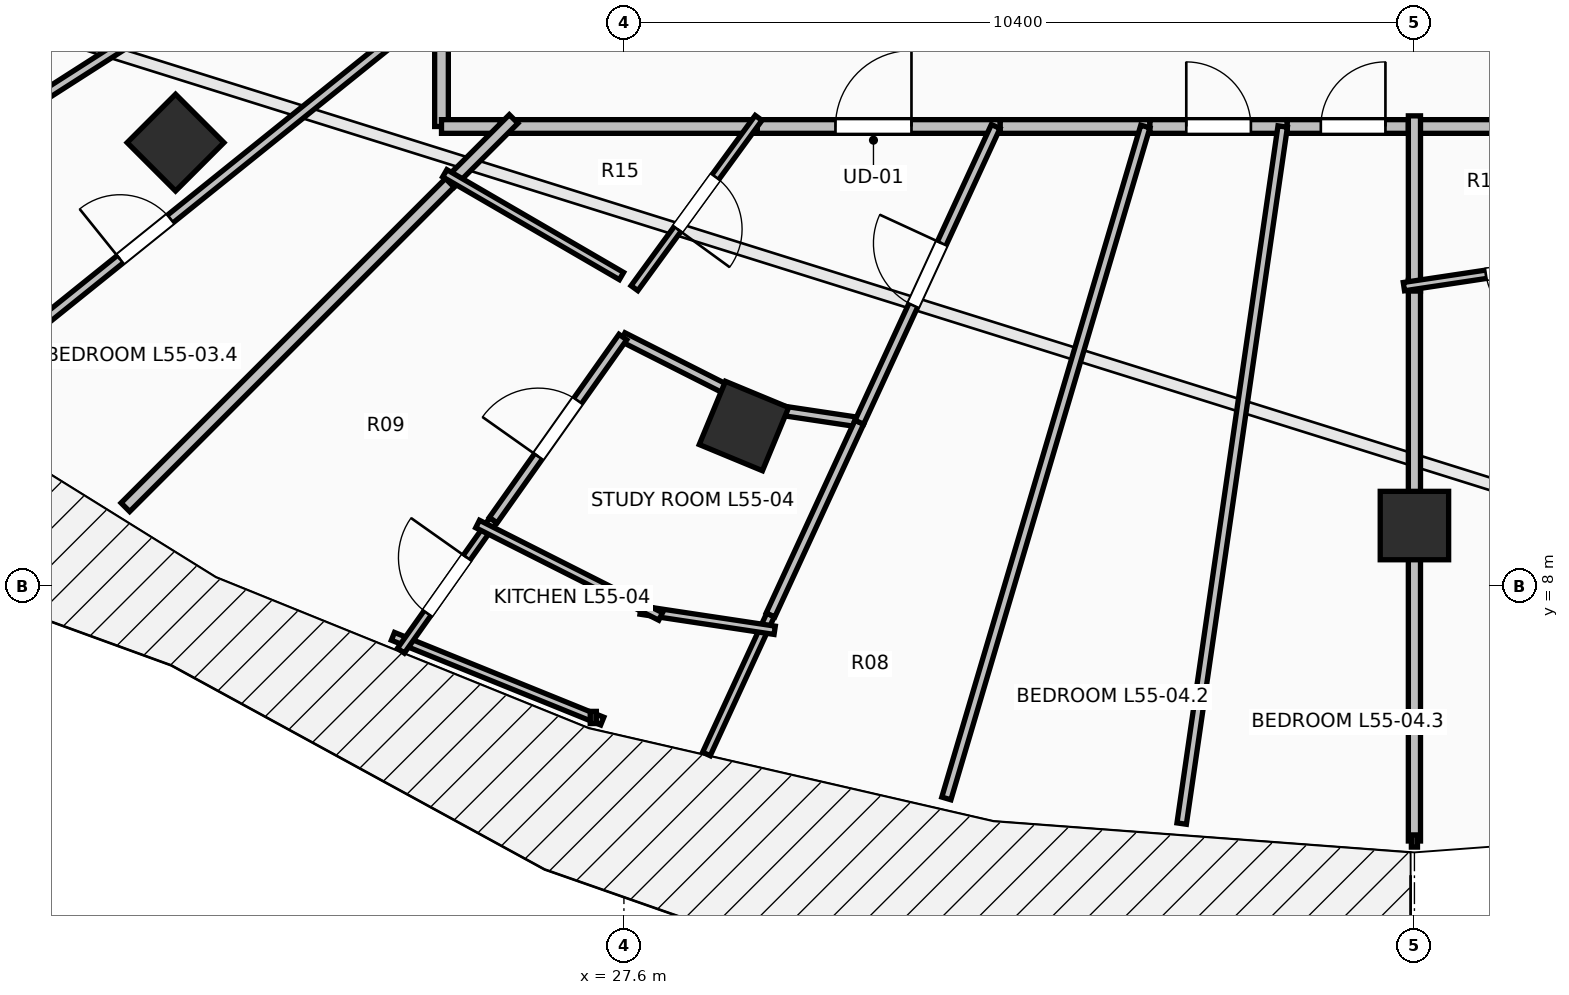
"""IFC4 building model, lengths in metres.
Left out: names, types, materials, properties, quantities, classifications, styles, units other than length and angle.
Written with IfcOpenShell. Run it as: python <this file> out.ifc"""

import sys

from ifc_helpers import new_model, si_unit, direction, frame, frame_2d, origin, origin_2d, place, context, subcontext, project, spatial, rectangle, extrude, element, fill, save


model = new_model("IFC4")
c1 = context("Model", 3, precision=1e-05, world=origin(), true_north=direction((0.0, 1.0)))
c2 = subcontext(c1, "Body", "Model", "MODEL_VIEW")
j1 = project(units=[si_unit("LENGTHUNIT", "METRE"), si_unit("PLANEANGLEUNIT", "RADIAN")], contexts=[c1])
p1 = place(None, origin())
s1 = spatial("IfcSite", under=j1, at=p1, CompositionType="ELEMENT")
p2 = place(p1, origin())
s2 = spatial("IfcBuilding", under=s1, at=p2, CompositionType="ELEMENT")
p3 = place(p2, frame((0.0, 0.0, 203.65)))
s3 = spatial("IfcBuildingStorey", under=s2, at=p3, CompositionType="ELEMENT", Elevation=203.65)
for number, where, z_axis, x_axis in (
    (1, (21.701, 13.838, 0.0), (0.0, 0.0, 1.0), (-0.707, -0.707, 0.0)),
    (2, (29.179, 10.109, 0.0), (0.0, 0.0, 1.0), (-0.383, -0.924, 0.0)),
    (3, (38.0, 8.8, 0.0), (0.0, 0.0, 1.0), (0.0, -1.0, 0.0)),
):
    element("IfcColumn", number, at=place(p3, frame(where, z_axis=z_axis, x_axis=x_axis)), inside=s3, PredefinedType="COLUMN", context=c2, shape_type="SweptSolid", body=[
        extrude(rectangle(XDim=0.9, YDim=0.9, at=origin_2d()), origin(), (0.0, 0.0, 1.0), 3.55),
    ])
p4 = place(p3, frame((25.2, 15.627, 0.0), z_axis=(0.0, 0.0, 1.0), x_axis=(0.0, -1.0, 0.0)))
e4 = element("IfcWall", 4, at=p4, inside=s3, PredefinedType="PARTITIONING", context=c2, shape_type="SweptSolid", body=[
    extrude(rectangle(XDim=1.577, YDim=0.18, at=frame_2d((0.789, 0.0))), origin(), (0.0, 0.0, 1.0), 2.482),
])
p5 = place(p3, frame((25.2, 14.05, 0.0), z_axis=(0.0, 0.0, 1.0), x_axis=(1.0, 0.0, 0.0)))
e5 = element("IfcWall", 5, at=p5, inside=s3, PredefinedType="PARTITIONING", context=c2, shape_type="SweptSolid", body=[
    extrude(rectangle(XDim=0.91, YDim=0.18, at=frame_2d((0.455, 0.0))), origin(), (0.0, 0.0, 1.0), 3.022),
])
p6 = place(p3, frame((29.215, 14.05, 0.0), z_axis=(0.0, 0.0, 1.0), x_axis=(1.0, 0.0, 0.0)))
e6 = element("IfcWall", 6, at=p6, inside=s3, PredefinedType="PARTITIONING", context=c2, shape_type="SweptSolid", body=[
    extrude(rectangle(XDim=3.336, YDim=0.18, at=frame_2d((1.668, 0.0))), origin(), (0.0, 0.0, 1.0), 2.936),
])
p7 = place(p6, frame((1.168, 0.0, 0.0)))
e7 = element("IfcOpeningElement", 7, at=p7, cuts=e6, PredefinedType="OPENING", context=c2, shape_type="SweptSolid", body=[
    extrude(rectangle(XDim=1.0, YDim=2.15, at=frame_2d((0.5, 1.075))), frame((0.0, 0.105, 0.0), z_axis=(0.0, -1.0, 0.0), x_axis=(1.0, 0.0, 0.0)), (0.0, 0.0, 1.0), 0.21),
])
p8 = place(p3, frame((25.97, 14.05, 0.0), z_axis=(0.0, 0.0, 1.0), x_axis=(1.0, 0.0, 0.0)))
e8 = element("IfcWall", 8, at=p8, inside=s3, PredefinedType="PARTITIONING", context=c2, shape_type="SweptSolid", body=[
    extrude(rectangle(XDim=3.385, YDim=0.18, at=frame_2d((1.692, 0.0))), origin(), (0.0, 0.0, 1.0), 2.482),
])
p9 = place(p3, frame((32.551, 14.05, 0.0), z_axis=(0.0, 0.0, 1.0), x_axis=(1.0, 0.0, 0.0)))
e9 = element("IfcWall", 9, at=p9, inside=s3, PredefinedType="PARTITIONING", context=c2, shape_type="SweptSolid", body=[
    extrude(rectangle(XDim=1.969, YDim=0.18, at=frame_2d((0.984, 0.0))), origin(), (0.0, 0.0, 1.0), 2.936),
])
p10 = place(p3, frame((34.52, 14.05, 0.0), z_axis=(0.0, 0.0, 1.0), x_axis=(1.0, 0.0, 0.0)))
e10 = element("IfcWall", 10, at=p10, inside=s3, PredefinedType="PARTITIONING", context=c2, shape_type="SweptSolid", body=[
    extrude(rectangle(XDim=1.807, YDim=0.18, at=frame_2d((0.903, 0.0))), origin(), (0.0, 0.0, 1.0), 2.936),
])
p11 = place(p10, frame((0.479, 0.0, 0.0)))
e11 = element("IfcOpeningElement", 11, at=p11, cuts=e10, PredefinedType="OPENING", context=c2, shape_type="SweptSolid", body=[
    extrude(rectangle(XDim=0.85, YDim=2.1, at=frame_2d((0.425, 1.05))), frame((0.0, 0.105, 0.0), z_axis=(0.0, -1.0, 0.0), x_axis=(1.0, 0.0, 0.0)), (0.0, 0.0, 1.0), 0.21),
])
p12 = place(p3, frame((36.327, 14.05, 0.0), z_axis=(0.0, 0.0, 1.0), x_axis=(1.0, 0.0, 0.0)))
e12 = element("IfcWall", 12, at=p12, inside=s3, PredefinedType="PARTITIONING", context=c2, shape_type="SweptSolid", body=[
    extrude(rectangle(XDim=1.733, YDim=0.18, at=frame_2d((0.867, 0.0))), origin(), (0.0, 0.0, 1.0), 2.936),
])
p13 = place(p12, frame((0.441, 0.0, 0.0)))
e13 = element("IfcOpeningElement", 13, at=p13, cuts=e12, PredefinedType="OPENING", context=c2, shape_type="SweptSolid", body=[
    extrude(rectangle(XDim=0.85, YDim=2.1, at=frame_2d((0.425, 1.05))), frame((0.0, 0.105, 0.0), z_axis=(0.0, -1.0, 0.0), x_axis=(1.0, 0.0, 0.0)), (0.0, 0.0, 1.0), 0.21),
])
p14 = place(p3, frame((37.92, 14.05, 0.0), z_axis=(0.0, 0.0, 1.0), x_axis=(1.0, 0.0, 0.0)))
e14 = element("IfcWall", 14, at=p14, inside=s3, PredefinedType="PARTITIONING", context=c2, shape_type="SweptSolid", body=[
    extrude(rectangle(XDim=2.545, YDim=0.18, at=frame_2d((1.272, 0.0))), origin(), (0.0, 0.0, 1.0), 2.936),
])
p15 = place(p3, frame((14.428, 14.28, 0.0), z_axis=(0.0, 0.0, 1.0), x_axis=(0.895423439435, 0.44521552546, 0.0)))
e15 = element("IfcWall", 15, at=p15, inside=s3, PredefinedType="PARTITIONING", context=c2, shape_type="SweptSolid", body=[
    extrude(rectangle(XDim=12.03, YDim=0.125, at=frame_2d((6.015, 0.0))), origin(), (0.0, 0.0, 1.0), 2.482),
])
p16 = place(p3, frame((16.555, 12.272, 0.0), z_axis=(0.0, 0.0, 1.0), x_axis=(0.842221721565, 0.539131312135, 0.0)))
e16 = element("IfcWall", 16, at=p16, inside=s3, PredefinedType="PARTITIONING", context=c2, shape_type="SweptSolid", body=[
    extrude(rectangle(XDim=10.265, YDim=0.125, at=frame_2d((5.132, 0.0))), origin(), (0.0, 0.0, 1.0), 2.482),
])
p17 = place(p3, frame((18.715, 10.487, 0.0), z_axis=(0.0, 0.0, 1.0), x_axis=(0.779157389419, 0.626828335762, 0.0)))
e17 = element("IfcWall", 17, at=p17, inside=s3, PredefinedType="PARTITIONING", context=c2, shape_type="SweptSolid", body=[
    extrude(rectangle(XDim=8.323, YDim=0.125, at=frame_2d((4.162, 0.0))), origin(), (0.0, 0.0, 1.0), 2.482),
])
p18 = place(p17, frame((2.896, 0.0, 0.0)))
e18 = element("IfcOpeningElement", 18, at=p18, cuts=e17, PredefinedType="OPENING", context=c2, shape_type="SweptSolid", body=[
    extrude(rectangle(XDim=0.85, YDim=2.1, at=frame_2d((0.425, 1.05))), frame((0.0, 0.077, 0.0), z_axis=(0.0, -1.0, 0.0), x_axis=(1.0, 0.0, 0.0)), (0.0, 0.0, 1.0), 0.155),
])
p19 = place(p3, frame((21.041, 9.041, 0.0), z_axis=(0.0, 0.0, 1.0), x_axis=(0.707106781187, 0.707106781187, 0.0)))
e19 = element("IfcWall", 19, at=p19, inside=s3, PredefinedType="PARTITIONING", context=c2, shape_type="SweptSolid", body=[
    extrude(rectangle(XDim=6.176, YDim=0.16, at=frame_2d((3.088, 0.0))), origin(), (0.0, 0.0, 1.0), 2.824),
])
p20 = place(p3, frame((25.309, 13.309, 0.0), z_axis=(0.0, 0.0, 1.0), x_axis=(0.707106781187, 0.707106781187, 0.0)))
e20 = element("IfcWall", 20, at=p20, inside=s3, PredefinedType="PARTITIONING", context=c2, shape_type="SweptSolid", body=[
    extrude(rectangle(XDim=1.188, YDim=0.16, at=frame_2d((0.594, 0.0))), origin(), (0.0, 0.0, 1.0), 3.022),
])
p21 = place(p3, frame((29.372, 14.163, 0.0), z_axis=(0.0, 0.0, 1.0), x_axis=(-0.589066743954, -0.808084383693, 0.0)))
e21 = element("IfcWall", 21, at=p21, inside=s3, PredefinedType="PARTITIONING", context=c2, shape_type="SweptSolid", body=[
    extrude(rectangle(XDim=2.772, YDim=0.11, at=frame_2d((1.386, 0.0))), origin(), (0.0, 0.0, 1.0), 2.482),
])
p22 = place(p21, frame((0.961, 0.0, 0.0)))
e22 = element("IfcOpeningElement", 22, at=p22, cuts=e21, PredefinedType="OPENING", context=c2, shape_type="SweptSolid", body=[
    extrude(rectangle(XDim=0.85, YDim=2.1, at=frame_2d((0.425, 1.05))), frame((0.0, 0.07, 0.0), z_axis=(0.0, -1.0, 0.0), x_axis=(1.0, 0.0, 0.0)), (0.0, 0.0, 1.0), 0.14),
])
p23 = place(p3, frame((27.568, 12.083, 0.0), z_axis=(0.0, 0.0, 1.0), x_axis=(-0.864515441931, 0.502606258082, 0.0)))
e23 = element("IfcWall", 23, at=p23, inside=s3, PredefinedType="PARTITIONING", context=c2, shape_type="SweptSolid", body=[
    extrude(rectangle(XDim=2.69, YDim=0.11, at=frame_2d((1.345, 0.0))), origin(), (0.0, 0.0, 1.0), 3.29),
])
p24 = place(p3, frame((29.529, 7.624, 0.0), z_axis=(0.0, 0.0, 1.0), x_axis=(-0.418673802252, -0.908136689771, 0.0)))
e24 = element("IfcWall", 24, at=p24, inside=s3, PredefinedType="PARTITIONING", context=c2, shape_type="SweptSolid", body=[
    extrude(rectangle(XDim=2.014, YDim=0.11, at=frame_2d((1.007, 0.0))), origin(), (0.0, 0.0, 1.0), 3.29),
])
p25 = place(p3, frame((24.561, 7.343, 0.0), z_axis=(0.0, 0.0, 1.0), x_axis=(0.926858319785, -0.375411314487, 0.0)))
e25 = element("IfcWall", 25, at=p25, inside=s3, PredefinedType="PARTITIONING", context=c2, shape_type="SweptSolid", body=[
    extrude(rectangle(XDim=2.971, YDim=0.11, at=frame_2d((1.485, 0.0))), origin(), (0.0, 0.0, 1.0), 3.29),
])
p26 = place(p3, frame((24.666, 7.154, 0.0), z_axis=(0.0, 0.0, 1.0), x_axis=(0.577389248155, 0.816469017241, 0.0)))
e26 = element("IfcWall", 26, at=p26, inside=s3, PredefinedType="PARTITIONING", context=c2, shape_type="SweptSolid", body=[
    extrude(rectangle(XDim=2.104, YDim=0.11, at=frame_2d((1.052, 0.0))), origin(), (0.0, 0.0, 1.0), 3.29),
])
p27 = place(p26, frame((0.602, 0.0, 0.0)))
e27 = element("IfcOpeningElement", 27, at=p27, cuts=e26, PredefinedType="OPENING", context=c2, shape_type="SweptSolid", body=[
    extrude(rectangle(XDim=0.9, YDim=2.1, at=frame_2d((0.45, 1.05))), frame((0.0, 0.07, 0.0), z_axis=(0.0, -1.0, 0.0), x_axis=(1.0, 0.0, 0.0)), (0.0, 0.0, 1.0), 0.14),
])
p28 = place(p3, frame((27.586, 11.28, 0.0), z_axis=(0.0, 0.0, 1.0), x_axis=(0.89250267167, -0.451042105643, 0.0)))
e28 = element("IfcWall", 28, at=p28, inside=s3, PredefinedType="PARTITIONING", context=c2, shape_type="SweptSolid", body=[
    extrude(rectangle(XDim=2.064, YDim=0.125, at=frame_2d((1.032, 0.0))), origin(), (0.0, 0.0, 1.0), 2.482),
])
p29 = place(p3, frame((29.428, 10.349, 0.0), z_axis=(0.0, 0.0, 1.0), x_axis=(0.988955881685, -0.148210202353, 0.0)))
e29 = element("IfcWall", 29, at=p29, inside=s3, PredefinedType="PARTITIONING", context=c2, shape_type="SweptSolid", body=[
    extrude(rectangle(XDim=1.283, YDim=0.125, at=frame_2d((0.642, 0.0))), origin(), (0.0, 0.0, 1.0), 3.29),
])
p30 = place(p3, frame((30.697, 10.159, 0.0), z_axis=(0.0, 0.0, 1.0), x_axis=(-0.41861439522, -0.908164075547, 0.0)))
e30 = element("IfcWall", 30, at=p30, inside=s3, PredefinedType="PARTITIONING", context=c2, shape_type="SweptSolid", body=[
    extrude(rectangle(XDim=2.791, YDim=0.125, at=frame_2d((1.396, 0.0))), origin(), (0.0, 0.0, 1.0), 2.824),
])
p31 = place(p3, frame((25.881, 8.871, 0.0), z_axis=(0.0, 0.0, 1.0), x_axis=(0.577734997211, 0.816224401128, 0.0)))
e31 = element("IfcWall", 31, at=p31, inside=s3, PredefinedType="PARTITIONING", context=c2, shape_type="SweptSolid", body=[
    extrude(rectangle(XDim=2.951, YDim=0.125, at=frame_2d((1.476, 0.0))), origin(), (0.0, 0.0, 1.0), 2.824),
])
p32 = place(p31, frame((1.026, 0.0, 0.0)))
e32 = element("IfcOpeningElement", 32, at=p32, cuts=e31, PredefinedType="OPENING", context=c2, shape_type="SweptSolid", body=[
    extrude(rectangle(XDim=0.9, YDim=2.1, at=frame_2d((0.45, 1.05))), frame((0.0, 0.077, 0.0), z_axis=(0.0, -1.0, 0.0), x_axis=(1.0, 0.0, 0.0)), (0.0, 0.0, 1.0), 0.155),
])
p33 = place(p3, frame((30.697, 10.159, 0.0), z_axis=(0.0, 0.0, 1.0), x_axis=(0.418635364892, 0.908154409372, 0.0)))
e33 = element("IfcWall", 33, at=p33, inside=s3, PredefinedType="PARTITIONING", context=c2, shape_type="SweptSolid", body=[
    extrude(rectangle(XDim=4.285, YDim=0.125, at=frame_2d((2.142, 0.0))), origin(), (0.0, 0.0, 1.0), 2.936),
])
p34 = place(p33, frame((1.692, 0.0, 0.0)))
e34 = element("IfcOpeningElement", 34, at=p34, cuts=e33, PredefinedType="OPENING", context=c2, shape_type="SweptSolid", body=[
    extrude(rectangle(XDim=0.9, YDim=2.1, at=frame_2d((0.45, 1.05))), frame((0.0, 0.077, 0.0), z_axis=(0.0, -1.0, 0.0), x_axis=(1.0, 0.0, 0.0)), (0.0, 0.0, 1.0), 0.155),
])
p35 = place(p3, frame((29.583, 7.422, 0.0), z_axis=(0.0, 0.0, 1.0), x_axis=(-0.988830695744, 0.149043131857, 0.0)))
e35 = element("IfcWall", 35, at=p35, inside=s3, PredefinedType="PARTITIONING", context=c2, shape_type="SweptSolid", body=[
    extrude(rectangle(XDim=1.784, YDim=0.11, at=frame_2d((0.892, 0.0))), origin(), (0.0, 0.0, 1.0), 3.29),
])
p36 = place(p3, frame((28.083, 7.604, 0.0), z_axis=(0.0, 0.0, 1.0), x_axis=(-0.892628057427, 0.450793911999, 0.0)))
e36 = element("IfcWall", 36, at=p36, inside=s3, PredefinedType="PARTITIONING", context=c2, shape_type="SweptSolid", body=[
    extrude(rectangle(XDim=2.698, YDim=0.11, at=frame_2d((1.349, 0.0))), origin(), (0.0, 0.0, 1.0), 3.29),
])
p37 = place(p3, frame((31.842, 5.21, 0.0), z_axis=(0.0, 0.0, 1.0), x_axis=(0.283952183478, 0.958838441813, 0.0)))
e37 = element("IfcWall", 37, at=p37, inside=s3, PredefinedType="PARTITIONING", context=c2, shape_type="SweptSolid", body=[
    extrude(rectangle(XDim=9.219, YDim=0.125, at=frame_2d((4.61, 0.0))), origin(), (0.0, 0.0, 1.0), 2.824),
])
p38 = place(p3, frame((34.938, 4.879, 0.0), z_axis=(0.0, 0.0, 1.0), x_axis=(0.143423836858, 0.989661357749, 0.0)))
e38 = element("IfcWall", 38, at=p38, inside=s3, PredefinedType="PARTITIONING", context=c2, shape_type="SweptSolid", body=[
    extrude(rectangle(XDim=9.267, YDim=0.125, at=frame_2d((4.633, 0.0))), origin(), (0.0, 0.0, 1.0), 2.824),
])
p39 = place(p3, frame((38.0, 4.65, 0.0), z_axis=(0.0, 0.0, 1.0), x_axis=(0.0, 1.0, 0.0)))
e39 = element("IfcWall", 39, at=p39, inside=s3, PredefinedType="PARTITIONING", context=c2, shape_type="SweptSolid", body=[
    extrude(rectangle(XDim=7.375, YDim=0.16, at=frame_2d((3.688, 0.0))), origin(), (0.0, 0.0, 1.0), 3.022),
])
p40 = place(p3, frame((38.0, 11.885, 0.0), z_axis=(0.0, 0.0, 1.0), x_axis=(0.0, 1.0, 0.0)))
e40 = element("IfcWall", 40, at=p40, inside=s3, PredefinedType="PARTITIONING", context=c2, shape_type="SweptSolid", body=[
    extrude(rectangle(XDim=2.305, YDim=0.16, at=frame_2d((1.152, 0.0))), origin(), (0.0, 0.0, 1.0), 2.936),
])
p41 = place(p3, frame((40.857, 12.394, 0.0), z_axis=(0.0, 0.0, 1.0), x_axis=(-0.988873015636, -0.148762088409, 0.0)))
e41 = element("IfcWall", 41, at=p41, inside=s3, PredefinedType="PARTITIONING", context=c2, shape_type="SweptSolid", body=[
    extrude(rectangle(XDim=3.03, YDim=0.11, at=frame_2d((1.515, 0.0))), origin(), (0.0, 0.0, 1.0), 3.29),
])
p42 = place(p41, frame((1.09, 0.0, 0.0)))
e42 = element("IfcOpeningElement", 42, at=p42, cuts=e41, PredefinedType="OPENING", context=c2, shape_type="SweptSolid", body=[
    extrude(rectangle(XDim=0.85, YDim=2.1, at=frame_2d((0.425, 1.05))), frame((0.0, 0.07, 0.0), z_axis=(0.0, -1.0, 0.0), x_axis=(1.0, 0.0, 0.0)), (0.0, 0.0, 1.0), 0.14),
])
p43 = place(p7, origin())
e43 = element("IfcDoor", 43, at=p43, inside=s3, OperationType="SINGLE_SWING_RIGHT", PredefinedType="DOOR", context=c2, shape_type="SweptSolid", body=[
    extrude(rectangle(XDim=1.0, YDim=2.15, at=frame_2d((0.5, 1.075))), frame((0.0, 0.025, 0.0), z_axis=(0.0, -1.0, 0.0), x_axis=(1.0, 0.0, 0.0)), (0.0, 0.0, 1.0), 0.05),
])
fill(e7, e43)
p44 = place(p22, origin())
e44 = element("IfcDoor", 44, at=p44, inside=s3, OperationType="SINGLE_SWING_RIGHT", PredefinedType="DOOR", context=c2, shape_type="SweptSolid", body=[
    extrude(rectangle(XDim=0.85, YDim=2.1, at=frame_2d((0.425, 1.05))), frame((0.0, 0.025, 0.0), z_axis=(0.0, -1.0, 0.0), x_axis=(1.0, 0.0, 0.0)), (0.0, 0.0, 1.0), 0.05),
])
fill(e22, e44)
p45 = place(p27, origin())
e45 = element("IfcDoor", 45, at=p45, inside=s3, OperationType="SINGLE_SWING_RIGHT", PredefinedType="DOOR", context=c2, shape_type="SweptSolid", body=[
    extrude(rectangle(XDim=0.9, YDim=2.1, at=frame_2d((0.45, 1.05))), frame((0.0, 0.025, 0.0), z_axis=(0.0, -1.0, 0.0), x_axis=(1.0, 0.0, 0.0)), (0.0, 0.0, 1.0), 0.05),
])
fill(e27, e45)
p46 = place(p32, origin())
e46 = element("IfcDoor", 46, at=p46, inside=s3, OperationType="SINGLE_SWING_LEFT", PredefinedType="DOOR", context=c2, shape_type="SweptSolid", body=[
    extrude(rectangle(XDim=0.9, YDim=2.1, at=frame_2d((0.45, 1.05))), frame((0.0, 0.025, 0.0), z_axis=(0.0, -1.0, 0.0), x_axis=(1.0, 0.0, 0.0)), (0.0, 0.0, 1.0), 0.05),
])
fill(e32, e46)
p47 = place(p34, origin())
e47 = element("IfcDoor", 47, at=p47, inside=s3, OperationType="SINGLE_SWING_RIGHT", PredefinedType="DOOR", context=c2, shape_type="SweptSolid", body=[
    extrude(rectangle(XDim=0.9, YDim=2.1, at=frame_2d((0.45, 1.05))), frame((0.0, 0.025, 0.0), z_axis=(0.0, -1.0, 0.0), x_axis=(1.0, 0.0, 0.0)), (0.0, 0.0, 1.0), 0.05),
])
fill(e34, e47)
p48 = place(p42, origin())
e48 = element("IfcDoor", 48, at=p48, inside=s3, OperationType="SINGLE_SWING_LEFT", PredefinedType="DOOR", context=c2, shape_type="SweptSolid", body=[
    extrude(rectangle(XDim=0.85, YDim=2.1, at=frame_2d((0.425, 1.05))), frame((0.0, 0.025, 0.0), z_axis=(0.0, -1.0, 0.0), x_axis=(1.0, 0.0, 0.0)), (0.0, 0.0, 1.0), 0.05),
])
fill(e42, e48)
p49 = place(p11, origin())
e49 = element("IfcDoor", 49, at=p49, inside=s3, OperationType="SINGLE_SWING_LEFT", PredefinedType="DOOR", context=c2, shape_type="SweptSolid", body=[
    extrude(rectangle(XDim=0.85, YDim=2.1, at=frame_2d((0.425, 1.05))), frame((0.0, 0.025, 0.0), z_axis=(0.0, -1.0, 0.0), x_axis=(1.0, 0.0, 0.0)), (0.0, 0.0, 1.0), 0.05),
])
fill(e11, e49)
p50 = place(p13, origin())
e50 = element("IfcDoor", 50, at=p50, inside=s3, OperationType="SINGLE_SWING_RIGHT", PredefinedType="DOOR", context=c2, shape_type="SweptSolid", body=[
    extrude(rectangle(XDim=0.85, YDim=2.1, at=frame_2d((0.425, 1.05))), frame((0.0, 0.025, 0.0), z_axis=(0.0, -1.0, 0.0), x_axis=(1.0, 0.0, 0.0)), (0.0, 0.0, 1.0), 0.05),
])
fill(e13, e50)
p51 = place(p18, origin())
e51 = element("IfcDoor", 51, at=p51, inside=s3, OperationType="SINGLE_SWING_LEFT", PredefinedType="DOOR", context=c2, shape_type="SweptSolid", body=[
    extrude(rectangle(XDim=0.85, YDim=2.1, at=frame_2d((0.425, 1.05))), frame((0.0, 0.025, 0.0), z_axis=(0.0, -1.0, 0.0), x_axis=(1.0, 0.0, 0.0)), (0.0, 0.0, 1.0), 0.05),
])
fill(e18, e51)
save(model, sys.argv[1])
